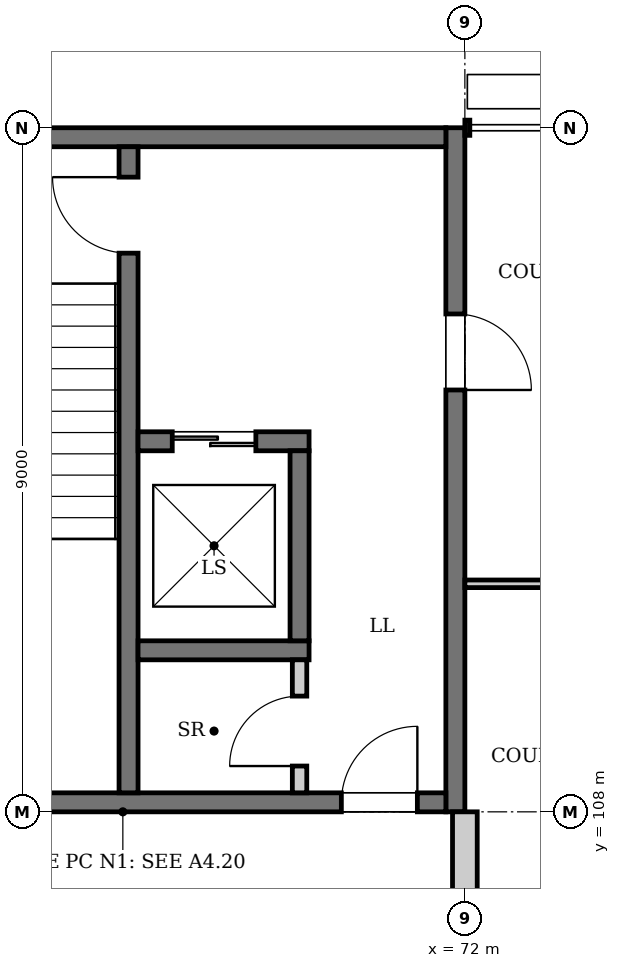
"""IFC4 building model, lengths in metres.
Left out: names, types, materials, properties, quantities, classifications, styles, units other than length and angle.
Written with IfcOpenShell. Run it as: python <this file> out.ifc"""

import sys

from ifc_helpers import new_model, si_unit, direction, frame, frame_2d, origin, place, context, subcontext, project, spatial, rectangle, extrude, element, fill, save


model = new_model("IFC4")
c1 = context("Model", 3, precision=1e-05, world=origin(), true_north=direction((0.0, 1.0)))
c2 = subcontext(c1, "Body", "Model", "MODEL_VIEW")
j1 = project(units=[si_unit("LENGTHUNIT", "METRE"), si_unit("PLANEANGLEUNIT", "RADIAN")], contexts=[c1])
p1 = place(None, origin())
s1 = spatial("IfcSite", under=j1, at=p1, CompositionType="ELEMENT")
p2 = place(p1, origin())
s2 = spatial("IfcBuilding", under=s1, at=p2, CompositionType="ELEMENT")
p3 = place(p2, frame((0.0, 0.0, 6.0)))
s3 = spatial("IfcBuildingStorey", under=s2, at=p3, CompositionType="ELEMENT", Elevation=6.0)
p4 = place(p3, frame((71.875, 108.0, 0.0), z_axis=(0.0, 0.0, 1.0), x_axis=(0.0, 1.0, 0.0)))
e1 = element("IfcWall", 1, at=p4, inside=s3, PredefinedType="SHEAR", context=c2, shape_type="SweptSolid", body=[
    extrude(rectangle(XDim=9.0, YDim=0.25, at=frame_2d((4.5, 0.0))), origin(), (0.0, 0.0, 1.0), 4.5),
])
p5 = place(p4, frame((5.55, 0.0, 0.0)))
e2 = element("IfcOpeningElement", 2, at=p5, cuts=e1, PredefinedType="OPENING", context=c2, shape_type="SweptSolid", body=[
    extrude(rectangle(XDim=1.0, YDim=2.1, at=frame_2d((0.5, 1.05))), frame((0.0, 0.135, 0.0), z_axis=(0.0, -1.0, 0.0), x_axis=(1.0, 0.0, 0.0)), (0.0, 0.0, 1.0), 0.27),
])
p6 = place(p3, frame((63.25, 108.125, 0.0), z_axis=(0.0, 0.0, 1.0), x_axis=(1.0, 0.0, 0.0)))
e3 = element("IfcWall", 3, at=p6, inside=s3, PredefinedType="SHEAR", context=c2, shape_type="SweptSolid", body=[
    extrude(rectangle(XDim=8.5, YDim=0.25, at=frame_2d((4.25, 0.0))), origin(), (0.0, 0.0, 1.0), 4.5),
])
p7 = place(p6, frame((7.125, 0.0, 0.0)))
e4 = element("IfcOpeningElement", 4, at=p7, cuts=e3, PredefinedType="OPENING", context=c2, shape_type="SweptSolid", body=[
    extrude(rectangle(XDim=1.0, YDim=2.1, at=frame_2d((0.5, 1.05))), frame((0.0, 0.135, 0.0), z_axis=(0.0, -1.0, 0.0), x_axis=(1.0, 0.0, 0.0)), (0.0, 0.0, 1.0), 0.27),
])
p8 = place(p3, frame((63.25, 116.875, 0.0), z_axis=(0.0, 0.0, 1.0), x_axis=(1.0, 0.0, 0.0)))
e5 = element("IfcWall", 5, at=p8, inside=s3, PredefinedType="SHEAR", context=c2, shape_type="SweptSolid", body=[
    extrude(rectangle(XDim=8.5, YDim=0.25, at=frame_2d((4.25, 0.0))), origin(), (0.0, 0.0, 1.0), 4.5),
])
p9 = place(p3, frame((67.575, 116.75, 0.0), z_axis=(0.0, 0.0, 1.0), x_axis=(0.0, -1.0, 0.0)))
e6 = element("IfcWall", 6, at=p9, inside=s3, PredefinedType="SOLIDWALL", context=c2, shape_type="SweptSolid", body=[
    extrude(rectangle(XDim=8.5, YDim=0.25, at=frame_2d((4.25, 0.0))), origin(), (0.0, 0.0, 1.0), 4.25),
])
p10 = place(p9, frame((0.4, 0.0, 0.0)))
e7 = element("IfcOpeningElement", 7, at=p10, cuts=e6, PredefinedType="OPENING", context=c2, shape_type="SweptSolid", body=[
    extrude(rectangle(XDim=1.0, YDim=2.1, at=frame_2d((0.5, 1.05))), frame((0.0, 0.135, 0.0), z_axis=(0.0, -1.0, 0.0), x_axis=(1.0, 0.0, 0.0)), (0.0, 0.0, 1.0), 0.27),
])
p11 = place(p3, frame((67.7, 110.125, 0.0), z_axis=(0.0, 0.0, 1.0), x_axis=(1.0, 0.0, 0.0)))
e8 = element("IfcWall", 8, at=p11, inside=s3, PredefinedType="SOLIDWALL", context=c2, shape_type="SweptSolid", body=[
    extrude(rectangle(XDim=2.25, YDim=0.25, at=frame_2d((1.125, 0.0))), origin(), (0.0, 0.0, 1.0), 4.5),
])
p12 = place(p3, frame((67.7, 112.875, 0.0), z_axis=(0.0, 0.0, 1.0), x_axis=(1.0, 0.0, 0.0)))
e9 = element("IfcWall", 9, at=p12, inside=s3, PredefinedType="SOLIDWALL", context=c2, shape_type="SweptSolid", body=[
    extrude(rectangle(XDim=2.25, YDim=0.25, at=frame_2d((1.125, 0.0))), origin(), (0.0, 0.0, 1.0), 4.5),
])
p13 = place(p12, frame((0.45, 0.0, 0.0)))
e10 = element("IfcOpeningElement", 10, at=p13, cuts=e9, PredefinedType="OPENING", context=c2, shape_type="SweptSolid", body=[
    extrude(rectangle(XDim=1.1, YDim=2.1, at=frame_2d((0.55, 1.05))), frame((0.0, 0.135, 0.0), z_axis=(0.0, -1.0, 0.0), x_axis=(1.0, 0.0, 0.0)), (0.0, 0.0, 1.0), 0.27),
])
p14 = place(p3, frame((69.825, 110.25, 0.0), z_axis=(0.0, 0.0, 1.0), x_axis=(0.0, 1.0, 0.0)))
e11 = element("IfcWall", 11, at=p14, inside=s3, PredefinedType="SOLIDWALL", context=c2, shape_type="SweptSolid", body=[
    extrude(rectangle(XDim=2.5, YDim=0.25, at=frame_2d((1.25, 0.0))), origin(), (0.0, 0.0, 1.0), 4.5),
])
p15 = place(p3, frame((72.0, 111.0, 0.0), z_axis=(0.0, 0.0, 1.0), x_axis=(1.0, 0.0, 0.0)))
e12 = element("IfcWall", 12, at=p15, inside=s3, PredefinedType="PARTITIONING", context=c2, shape_type="SweptSolid", body=[
    extrude(rectangle(XDim=4.337, YDim=0.1, at=frame_2d((2.169, 0.0))), origin(), (0.0, 0.0, 1.0), 3.994),
])
p16 = place(p15, frame((1.8, 0.0, 0.0)))
e13 = element("IfcOpeningElement", 13, at=p16, cuts=e12, PredefinedType="OPENING", context=c2, shape_type="SweptSolid", body=[
    extrude(rectangle(XDim=1.0, YDim=2.1, at=frame_2d((0.5, 1.05))), frame((0.0, 0.06, 0.0), z_axis=(0.0, -1.0, 0.0), x_axis=(1.0, 0.0, 0.0)), (0.0, 0.0, 1.0), 0.12),
])
p17 = place(p3, frame((69.825, 108.25, 0.0), z_axis=(0.0, 0.0, 1.0), x_axis=(0.0, 1.0, 0.0)))
e14 = element("IfcWall", 14, at=p17, inside=s3, PredefinedType="PARTITIONING", context=c2, shape_type="SweptSolid", body=[
    extrude(rectangle(XDim=1.75, YDim=0.19, at=frame_2d((0.875, 0.0))), origin(), (0.0, 0.0, 1.0), 4.25),
])
p18 = place(p17, frame((0.353, 0.0, 0.0)))
e15 = element("IfcOpeningElement", 15, at=p18, cuts=e14, PredefinedType="OPENING", context=c2, shape_type="SweptSolid", body=[
    extrude(rectangle(XDim=0.92, YDim=2.1, at=frame_2d((0.46, 1.05))), frame((0.0, 0.105, 0.0), z_axis=(0.0, -1.0, 0.0), x_axis=(1.0, 0.0, 0.0)), (0.0, 0.0, 1.0), 0.21),
])
p19 = place(p3, frame((72.0, 105.163, 0.0), z_axis=(0.0, 0.0, 1.0), x_axis=(0.0, 1.0, 0.0)))
e16 = element("IfcWall", 16, at=p19, inside=s3, PredefinedType="PARTITIONING", context=c2, shape_type="SweptSolid", body=[
    extrude(rectangle(XDim=2.837, YDim=0.325, at=frame_2d((1.419, 0.0))), origin(), (0.0, 0.0, 1.0), 3.822),
])
p20 = place(p13, origin())
e17 = element("IfcDoor", 17, at=p20, inside=s3, OperationType="DOUBLE_DOOR_SLIDING", PredefinedType="DOOR", context=c2, shape_type="SweptSolid", body=[
    extrude(rectangle(XDim=1.1, YDim=2.1, at=frame_2d((0.55, 1.05))), frame((0.0, 0.025, 0.0), z_axis=(0.0, -1.0, 0.0), x_axis=(1.0, 0.0, 0.0)), (0.0, 0.0, 1.0), 0.05),
])
fill(e10, e17)
p21 = place(p10, frame((1.0, 0.0, 0.0), z_axis=(0.0, 0.0, 1.0), x_axis=(-1.0, 0.0, 0.0)))
e18 = element("IfcDoor", 18, at=p21, inside=s3, OperationType="SINGLE_SWING_RIGHT", PredefinedType="DOOR", context=c2, shape_type="SweptSolid", body=[
    extrude(rectangle(XDim=1.0, YDim=2.1, at=frame_2d((0.5, 1.05))), frame((0.0, 0.025, 0.0), z_axis=(0.0, -1.0, 0.0), x_axis=(1.0, 0.0, 0.0)), (0.0, 0.0, 1.0), 0.05),
])
fill(e7, e18)
p22 = place(p18, origin())
e19 = element("IfcDoor", 19, at=p22, inside=s3, OperationType="SINGLE_SWING_LEFT", PredefinedType="DOOR", context=c2, shape_type="SweptSolid", body=[
    extrude(rectangle(XDim=0.92, YDim=2.1, at=frame_2d((0.46, 1.05))), frame((0.0, 0.025, 0.0), z_axis=(0.0, -1.0, 0.0), x_axis=(1.0, 0.0, 0.0)), (0.0, 0.0, 1.0), 0.05),
])
fill(e15, e19)
p23 = place(p7, origin())
e20 = element("IfcDoor", 20, at=p23, inside=s3, OperationType="SINGLE_SWING_RIGHT", PredefinedType="DOOR", context=c2, shape_type="SweptSolid", body=[
    extrude(rectangle(XDim=1.0, YDim=2.1, at=frame_2d((0.5, 1.05))), frame((0.0, 0.025, 0.0), z_axis=(0.0, -1.0, 0.0), x_axis=(1.0, 0.0, 0.0)), (0.0, 0.0, 1.0), 0.05),
])
fill(e4, e20)
p24 = place(p5, frame((1.0, 0.0, 0.0), z_axis=(0.0, 0.0, 1.0), x_axis=(-1.0, 0.0, 0.0)))
e21 = element("IfcDoor", 21, at=p24, inside=s3, OperationType="SINGLE_SWING_RIGHT", PredefinedType="DOOR", context=c2, shape_type="SweptSolid", body=[
    extrude(rectangle(XDim=1.0, YDim=2.1, at=frame_2d((0.5, 1.05))), frame((0.0, 0.025, 0.0), z_axis=(0.0, -1.0, 0.0), x_axis=(1.0, 0.0, 0.0)), (0.0, 0.0, 1.0), 0.05),
])
fill(e2, e21)
save(model, sys.argv[1])
